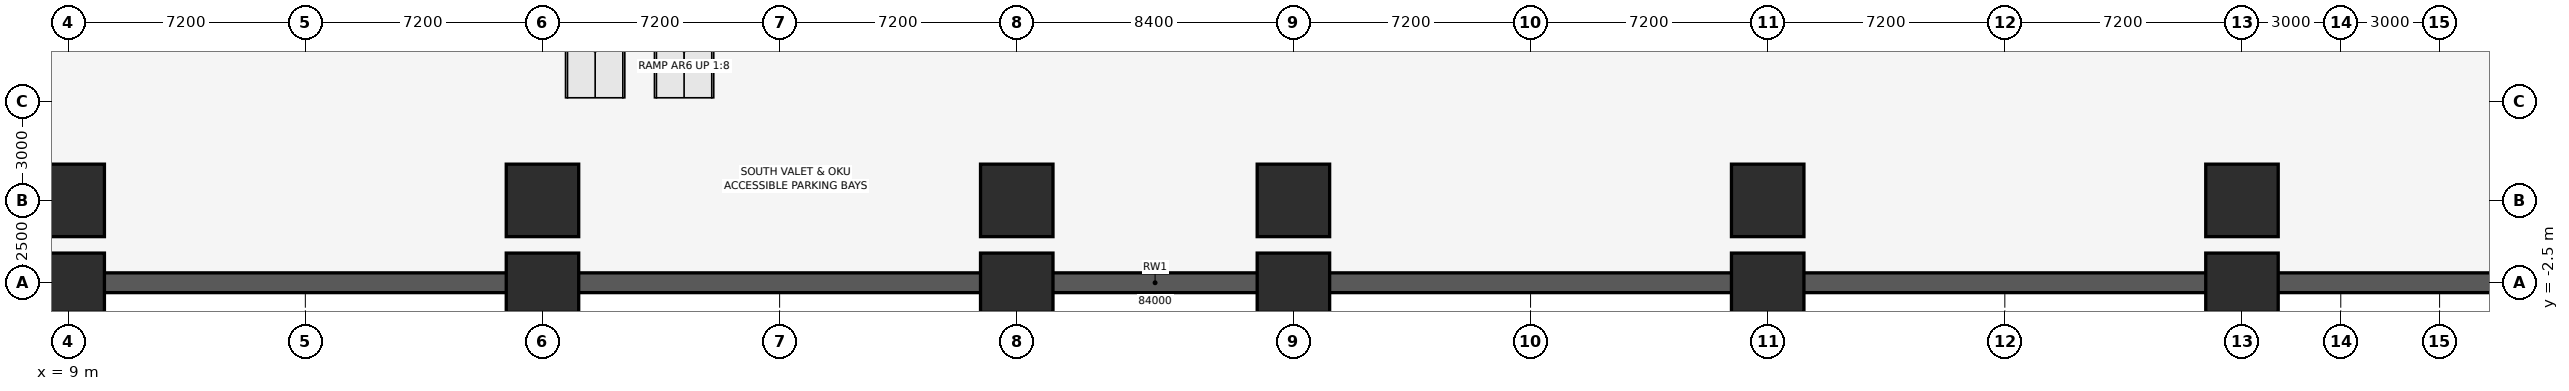
"""IFC4 building model, lengths in metres.
Left out: names, types, materials, properties, quantities, classifications, styles, units other than length and angle.
Written with IfcOpenShell. Run it as: python <this file> out.ifc"""

import sys

from ifc_helpers import new_model, si_unit, direction, frame, frame_2d, origin, origin_2d, place, context, subcontext, project, spatial, rectangle, circle, extrude, element, save


model = new_model("IFC4")
c1 = context("Model", 3, precision=1e-05, world=origin(), true_north=direction((0.0, 1.0)))
c2 = subcontext(c1, "Body", "Model", "MODEL_VIEW")
j1 = project(units=[si_unit("LENGTHUNIT", "METRE"), si_unit("PLANEANGLEUNIT", "RADIAN")], contexts=[c1])
p1 = place(None, origin())
s1 = spatial("IfcSite", under=j1, at=p1, CompositionType="ELEMENT")
p2 = place(p1, origin())
s2 = spatial("IfcBuilding", under=s1, at=p2, CompositionType="ELEMENT")
p3 = place(p2, frame((0.0, 0.0, -9.2)))
s3 = spatial("IfcBuildingStorey", under=s2, at=p3, CompositionType="ELEMENT", Elevation=-9.2)
p4 = place(p3, frame((9.0, 0.0, 0.0), z_axis=(0.0, 0.0, 1.0), x_axis=(1.0, 0.0, 0.0)))
e1 = element("IfcColumn", 1, at=p4, inside=s3, PredefinedType="USERDEFINED", context=c2, shape_type="SweptSolid", body=[
    extrude(circle(Radius=1.1, at=origin_2d()), origin(), (0.0, 0.0, 1.0), 4.3),
])
p5 = place(p3, frame((9.0, -2.5, 0.0), z_axis=(0.0, 0.0, 1.0), x_axis=(1.0, 0.0, 0.0)))
e2 = element("IfcColumn", 2, at=p5, inside=s3, PredefinedType="USERDEFINED", context=c2, shape_type="SweptSolid", body=[
    extrude(rectangle(XDim=2.2, YDim=1.8, at=origin_2d()), origin(), (0.0, 0.0, 1.0), 4.3),
])
p6 = place(p3, frame((23.4, 0.0, 0.0), z_axis=(0.0, 0.0, 1.0), x_axis=(1.0, 0.0, 0.0)))
e3 = element("IfcColumn", 3, at=p6, inside=s3, PredefinedType="USERDEFINED", context=c2, shape_type="SweptSolid", body=[
    extrude(circle(Radius=1.1, at=origin_2d()), origin(), (0.0, 0.0, 1.0), 4.3),
])
p7 = place(p3, frame((23.4, -2.5, 0.0), z_axis=(0.0, 0.0, 1.0), x_axis=(1.0, 0.0, 0.0)))
e4 = element("IfcColumn", 4, at=p7, inside=s3, PredefinedType="USERDEFINED", context=c2, shape_type="SweptSolid", body=[
    extrude(rectangle(XDim=2.2, YDim=1.8, at=origin_2d()), origin(), (0.0, 0.0, 1.0), 4.3),
])
p8 = place(p3, frame((37.8, 0.0, 0.0), z_axis=(0.0, 0.0, 1.0), x_axis=(1.0, 0.0, 0.0)))
e5 = element("IfcColumn", 5, at=p8, inside=s3, PredefinedType="USERDEFINED", context=c2, shape_type="SweptSolid", body=[
    extrude(circle(Radius=1.1, at=origin_2d()), origin(), (0.0, 0.0, 1.0), 4.3),
])
p9 = place(p3, frame((37.8, -2.5, 0.0), z_axis=(0.0, 0.0, 1.0), x_axis=(1.0, 0.0, 0.0)))
e6 = element("IfcColumn", 6, at=p9, inside=s3, PredefinedType="USERDEFINED", context=c2, shape_type="SweptSolid", body=[
    extrude(rectangle(XDim=2.2, YDim=1.8, at=origin_2d()), origin(), (0.0, 0.0, 1.0), 4.3),
])
p10 = place(p3, frame((46.2, 0.0, 0.0), z_axis=(0.0, 0.0, 1.0), x_axis=(1.0, 0.0, 0.0)))
e7 = element("IfcColumn", 7, at=p10, inside=s3, PredefinedType="USERDEFINED", context=c2, shape_type="SweptSolid", body=[
    extrude(circle(Radius=1.1, at=origin_2d()), origin(), (0.0, 0.0, 1.0), 4.3),
])
p11 = place(p3, frame((46.2, -2.5, 0.0), z_axis=(0.0, 0.0, 1.0), x_axis=(1.0, 0.0, 0.0)))
e8 = element("IfcColumn", 8, at=p11, inside=s3, PredefinedType="USERDEFINED", context=c2, shape_type="SweptSolid", body=[
    extrude(rectangle(XDim=2.2, YDim=1.8, at=origin_2d()), origin(), (0.0, 0.0, 1.0), 4.3),
])
p12 = place(p3, frame((60.6, 0.0, 0.0), z_axis=(0.0, 0.0, 1.0), x_axis=(1.0, 0.0, 0.0)))
e9 = element("IfcColumn", 9, at=p12, inside=s3, PredefinedType="USERDEFINED", context=c2, shape_type="SweptSolid", body=[
    extrude(circle(Radius=1.1, at=origin_2d()), origin(), (0.0, 0.0, 1.0), 4.3),
])
p13 = place(p3, frame((60.6, -2.5, 0.0), z_axis=(0.0, 0.0, 1.0), x_axis=(1.0, 0.0, 0.0)))
e10 = element("IfcColumn", 10, at=p13, inside=s3, PredefinedType="USERDEFINED", context=c2, shape_type="SweptSolid", body=[
    extrude(rectangle(XDim=2.2, YDim=1.8, at=origin_2d()), origin(), (0.0, 0.0, 1.0), 4.3),
])
p14 = place(p3, frame((75.0, 0.0, 0.0), z_axis=(0.0, 0.0, 1.0), x_axis=(1.0, 0.0, 0.0)))
e11 = element("IfcColumn", 11, at=p14, inside=s3, PredefinedType="USERDEFINED", context=c2, shape_type="SweptSolid", body=[
    extrude(circle(Radius=1.1, at=origin_2d()), origin(), (0.0, 0.0, 1.0), 4.3),
])
p15 = place(p3, frame((75.0, -2.5, 0.0), z_axis=(0.0, 0.0, 1.0), x_axis=(1.0, 0.0, 0.0)))
e12 = element("IfcColumn", 12, at=p15, inside=s3, PredefinedType="USERDEFINED", context=c2, shape_type="SweptSolid", body=[
    extrude(rectangle(XDim=2.2, YDim=1.8, at=origin_2d()), origin(), (0.0, 0.0, 1.0), 4.3),
])
p16 = place(p3, frame((0.4, -2.5, 0.0), z_axis=(0.0, 0.0, 1.0), x_axis=(1.0, 0.0, 0.0)))
e13 = element("IfcWall", 13, at=p16, inside=s3, PredefinedType="USERDEFINED", context=c2, shape_type="SweptSolid", body=[
    extrude(rectangle(XDim=83.2, YDim=0.6, at=frame_2d((41.6, 0.0))), origin(), (0.0, 0.0, 1.0), 4.3),
])
save(model, sys.argv[1])
